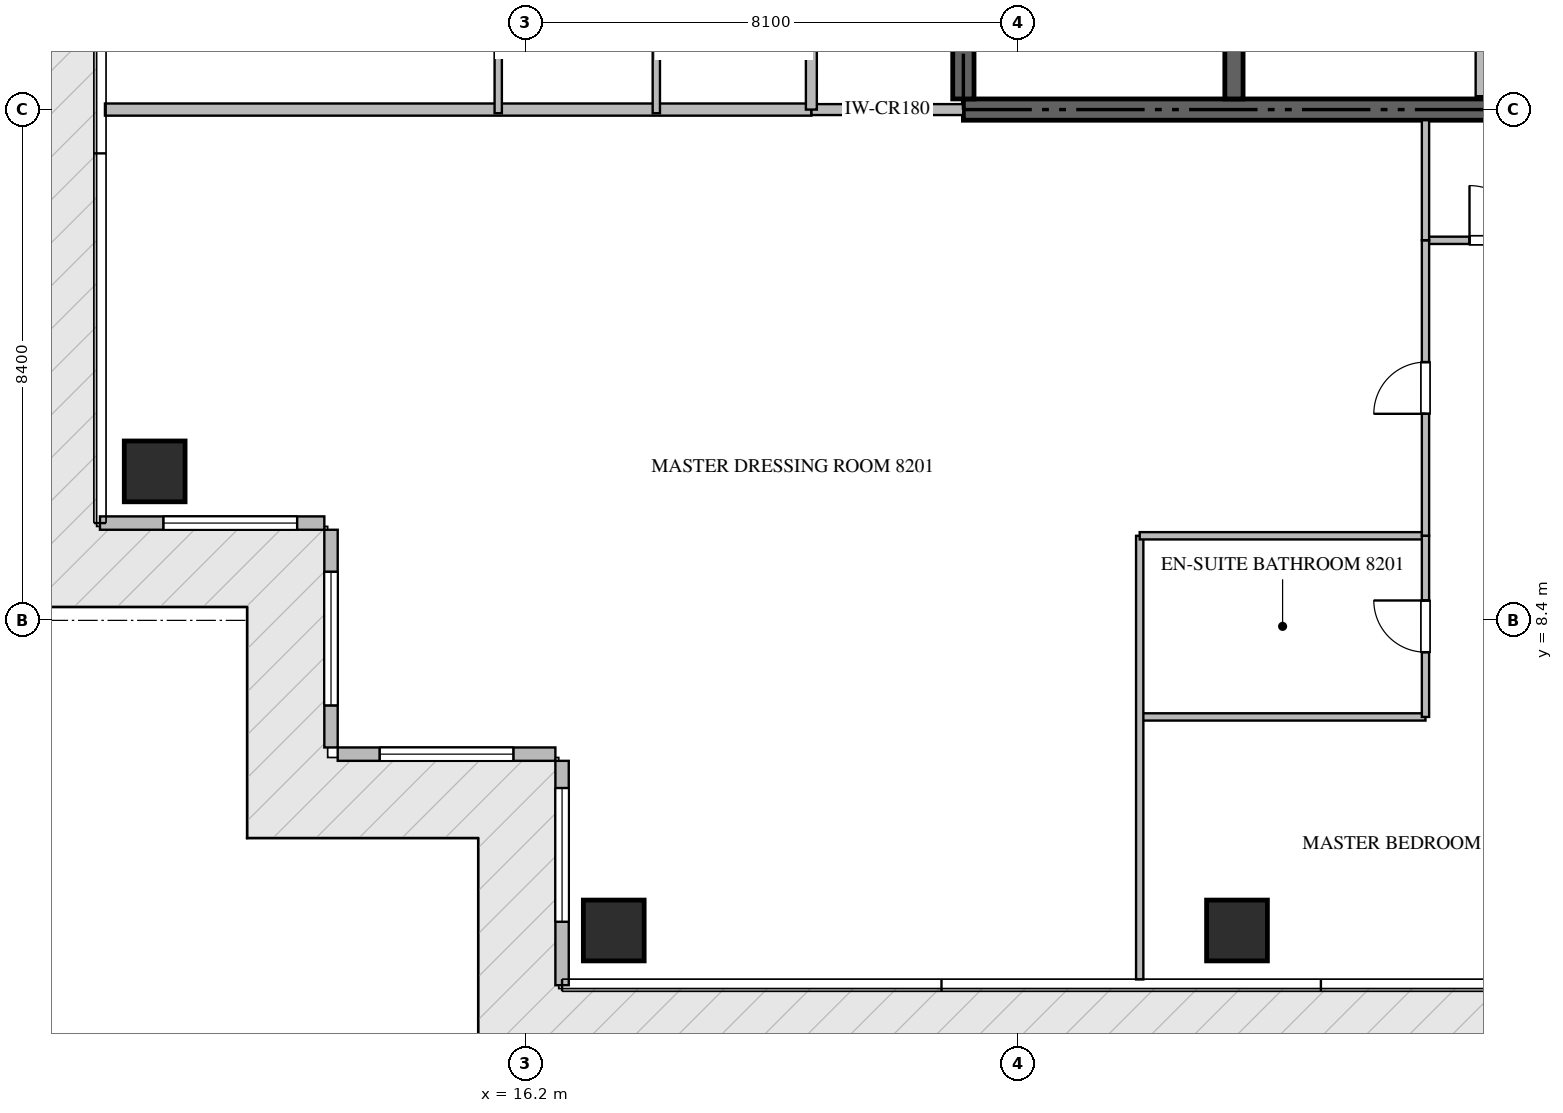
"""IFC4 building model, lengths in metres.
Left out: names, types, materials, properties, quantities, classifications, styles, units other than length and angle.
Written with IfcOpenShell. Run it as: python <this file> out.ifc"""

import sys

from ifc_helpers import new_model, si_unit, direction, frame, frame_2d, origin, origin_2d, place, context, subcontext, project, spatial, rectangle, extrude, source, transform, mapped, element, fill, save


model = new_model("IFC4")
c1 = context("Model", 3, precision=1e-05, world=origin(), true_north=direction((0.0, 1.0)))
c2 = subcontext(c1, "Body", "Model", "MODEL_VIEW")
j1 = project(units=[si_unit("LENGTHUNIT", "METRE"), si_unit("PLANEANGLEUNIT", "RADIAN")], contexts=[c1])
p1 = place(None, origin())
s1 = spatial("IfcSite", under=j1, at=p1, CompositionType="ELEMENT")
p2 = place(p1, origin())
s2 = spatial("IfcBuilding", under=s1, at=p2, CompositionType="ELEMENT")
p3 = place(p2, frame((0.0, 0.0, 329.9)))
s3 = spatial("IfcBuildingStorey", under=s2, at=p3, CompositionType="ELEMENT", Elevation=329.9)
p4 = place(p3, frame((23.4, 16.8, -0.26), z_axis=(0.0, 0.0, 1.0), x_axis=(1.0, 0.0, 0.0)))
e1 = element("IfcWall", 1, at=p4, inside=s3, PredefinedType="SHEAR", context=c2, shape_type="SweptSolid", body=[
    extrude(rectangle(XDim=18.0, YDim=0.35, at=frame_2d((9.0, 0.0))), origin(), (0.0, 0.0, 1.0), 4.048),
])
p5 = place(p3, frame((23.4, 16.975, -0.26), z_axis=(0.0, 0.0, 1.0), x_axis=(0.0, 1.0, 0.0)))
e2 = element("IfcWall", 2, at=p5, inside=s3, PredefinedType="SHEAR", context=c2, shape_type="SweptSolid", body=[
    extrude(rectangle(XDim=4.875, YDim=0.35, at=frame_2d((2.438, 0.0))), origin(), (0.0, 0.0, 1.0), 4.048),
])
p6 = place(p3, frame((27.85, 16.975, -0.26), z_axis=(0.0, 0.0, 1.0), x_axis=(0.0, 1.0, 0.0)))
e3 = element("IfcWall", 3, at=p6, inside=s3, PredefinedType="SHEAR", context=c2, shape_type="SweptSolid", body=[
    extrude(rectangle(XDim=4.875, YDim=0.3, at=frame_2d((2.438, 0.0))), origin(), (0.0, 0.0, 1.0), 4.048),
])
m1 = source(origin(), c2, "Body", "SweptSolid", [
    extrude(rectangle(XDim=1.0, YDim=1.0, at=origin_2d()), origin(), (0.0, 0.0, 1.0), 4.05),
])
for number, where, z_axis, x_axis in (
    (4, (17.65, 3.3, -0.26), (0.0, 0.0, 1.0), (1.0, 0.0, 0.0)),
    (5, (27.9, 3.3, -0.26), (0.0, 0.0, 1.0), (1.0, 0.0, 0.0)),
    (6, (10.1, 10.85, -0.26), (0.0, 0.0, 1.0), (1.0, 0.0, 0.0)),
):
    element("IfcColumn", number, at=place(p3, frame(where, z_axis=z_axis, x_axis=x_axis)), inside=s3, PredefinedType="COLUMN", context=c2, shape_type="MappedRepresentation", body=[
        mapped(m1, transform((0.0, 0.0, 0.0), scale=1.0)),
    ])
p7 = place(p3, frame((9.2, 10.0, 0.0), z_axis=(0.0, 0.0, 1.0), x_axis=(1.0, 0.0, 0.0)))
e7 = element("IfcWall", 7, at=p7, inside=s3, PredefinedType="ELEMENTEDWALL", context=c2, shape_type="SweptSolid", body=[
    extrude(rectangle(XDim=3.69, YDim=0.22, at=frame_2d((1.845, 0.0))), origin(), (0.0, 0.0, 1.0), 3.775),
])
p8 = place(p7, frame((1.043, 0.0, 0.65)))
e8 = element("IfcOpeningElement", 8, at=p8, cuts=e7, PredefinedType="OPENING", context=c2, shape_type="SweptSolid", body=[
    extrude(rectangle(XDim=2.2, YDim=2.4, at=frame_2d((1.1, 1.2))), frame((0.0, 0.12, 0.0), z_axis=(0.0, -1.0, 0.0), x_axis=(1.0, 0.0, 0.0)), (0.0, 0.0, 1.0), 0.24),
])
p9 = place(p3, frame((13.0, 9.89, 0.0), z_axis=(0.0, 0.0, 1.0), x_axis=(0.0, -1.0, 0.0)))
e9 = element("IfcWall", 9, at=p9, inside=s3, PredefinedType="ELEMENTEDWALL", context=c2, shape_type="SweptSolid", body=[
    extrude(rectangle(XDim=3.58, YDim=0.22, at=frame_2d((1.79, 0.0))), origin(), (0.0, 0.0, 1.0), 3.775),
])
p10 = place(p9, frame((0.69, 0.0, 0.65)))
e10 = element("IfcOpeningElement", 10, at=p10, cuts=e9, PredefinedType="OPENING", context=c2, shape_type="SweptSolid", body=[
    extrude(rectangle(XDim=2.2, YDim=2.4, at=frame_2d((1.1, 1.2))), frame((0.0, 0.12, 0.0), z_axis=(0.0, -1.0, 0.0), x_axis=(1.0, 0.0, 0.0)), (0.0, 0.0, 1.0), 0.24),
])
p11 = place(p3, frame((13.11, 6.2, 0.0), z_axis=(0.0, 0.0, 1.0), x_axis=(1.0, 0.0, 0.0)))
e11 = element("IfcWall", 11, at=p11, inside=s3, PredefinedType="ELEMENTEDWALL", context=c2, shape_type="SweptSolid", body=[
    extrude(rectangle(XDim=3.58, YDim=0.22, at=frame_2d((1.79, 0.0))), origin(), (0.0, 0.0, 1.0), 3.775),
])
p12 = place(p11, frame((0.69, 0.0, 0.65)))
e12 = element("IfcOpeningElement", 12, at=p12, cuts=e11, PredefinedType="OPENING", context=c2, shape_type="SweptSolid", body=[
    extrude(rectangle(XDim=2.2, YDim=2.4, at=frame_2d((1.1, 1.2))), frame((0.0, 0.12, 0.0), z_axis=(0.0, -1.0, 0.0), x_axis=(1.0, 0.0, 0.0)), (0.0, 0.0, 1.0), 0.24),
])
p13 = place(p3, frame((16.8, 6.09, 0.0), z_axis=(0.0, 0.0, 1.0), x_axis=(0.0, -1.0, 0.0)))
e13 = element("IfcWall", 13, at=p13, inside=s3, PredefinedType="ELEMENTEDWALL", context=c2, shape_type="SweptSolid", body=[
    extrude(rectangle(XDim=3.69, YDim=0.22, at=frame_2d((1.845, 0.0))), origin(), (0.0, 0.0, 1.0), 3.775),
])
p14 = place(p13, frame((0.447, 0.0, 0.65)))
e14 = element("IfcOpeningElement", 14, at=p14, cuts=e13, PredefinedType="OPENING", context=c2, shape_type="SweptSolid", body=[
    extrude(rectangle(XDim=2.2, YDim=2.4, at=frame_2d((1.1, 1.2))), frame((0.0, 0.12, 0.0), z_axis=(0.0, -1.0, 0.0), x_axis=(1.0, 0.0, 0.0)), (0.0, 0.0, 1.0), 0.24),
])
p15 = place(p3, frame((31.9, 17.02, 0.0), z_axis=(0.0, 0.0, 1.0), x_axis=(0.0, 1.0, 0.0)))
e15 = element("IfcWall", 15, at=p15, inside=s3, PredefinedType="PARTITIONING", context=c2, shape_type="SweptSolid", body=[
    extrude(rectangle(XDim=2.73, YDim=0.15, at=frame_2d((1.365, 0.0))), origin(), (0.0, 0.0, 1.0), 3.79),
])
p16 = place(p3, frame((9.282, 16.8, 0.0), z_axis=(0.0, 0.0, 1.0), x_axis=(1.0, 0.0, 0.0)))
e16 = element("IfcWall", 16, at=p16, inside=s3, PredefinedType="PARTITIONING", context=c2, shape_type="SweptSolid", body=[
    extrude(rectangle(XDim=11.618, YDim=0.2, at=frame_2d((5.809, 0.0))), origin(), (0.0, 0.0, 1.0), 3.79),
])
p17 = place(p3, frame((20.902, 16.8, 0.0), z_axis=(0.0, 0.0, 1.0), x_axis=(1.0, 0.0, 0.0)))
e17 = element("IfcWall", 17, at=p17, inside=s3, PredefinedType="PARTITIONING", context=c2, shape_type="SweptSolid", body=[
    extrude(rectangle(XDim=2.496, YDim=0.18, at=frame_2d((1.248, 0.0))), origin(), (0.0, 0.0, 1.0), 3.79),
])
p18 = place(p3, frame((20.9, 16.8, 0.0), z_axis=(0.0, 0.0, 1.0), x_axis=(0.0, 1.0, 0.0)))
e18 = element("IfcWall", 18, at=p18, inside=s3, PredefinedType="PARTITIONING", context=c2, shape_type="SweptSolid", body=[
    extrude(rectangle(XDim=16.8, YDim=0.18, at=frame_2d((8.4, 0.0))), origin(), (0.0, 0.0, 1.0), 3.79),
])
p19 = place(p18, frame((4.803, 0.0, 0.0)))
e19 = element("IfcOpeningElement", 19, at=p19, cuts=e18, PredefinedType="OPENING", context=c2, shape_type="SweptSolid", body=[
    extrude(rectangle(XDim=1.0, YDim=2.15, at=frame_2d((0.5, 1.075))), frame((0.0, 0.1, 0.0), z_axis=(0.0, -1.0, 0.0), x_axis=(1.0, 0.0, 0.0)), (0.0, 0.0, 1.0), 0.2),
])
p20 = place(p18, frame((13.225, 0.0, 0.0)))
e20 = element("IfcOpeningElement", 20, at=p20, cuts=e18, PredefinedType="OPENING", context=c2, shape_type="SweptSolid", body=[
    extrude(rectangle(XDim=1.0, YDim=2.15, at=frame_2d((0.5, 1.075))), frame((0.0, 0.1, 0.0), z_axis=(0.0, -1.0, 0.0), x_axis=(1.0, 0.0, 0.0)), (0.0, 0.0, 1.0), 0.2),
])
p21 = place(p3, frame((31.0, 14.65, 0.0), z_axis=(0.0, 0.0, 1.0), x_axis=(1.0, 0.0, 0.0)))
e21 = element("IfcWall", 21, at=p21, inside=s3, PredefinedType="PARTITIONING", context=c2, shape_type="SweptSolid", body=[
    extrude(rectangle(XDim=2.348, YDim=0.12, at=frame_2d((1.174, 0.0))), origin(), (0.0, 0.0, 1.0), 3.79),
])
p22 = place(p21, frame((0.724, 0.0, 0.0)))
e22 = element("IfcOpeningElement", 22, at=p22, cuts=e21, PredefinedType="OPENING", context=c2, shape_type="SweptSolid", body=[
    extrude(rectangle(XDim=0.9, YDim=2.1, at=frame_2d((0.45, 1.05))), frame((0.0, 0.07, 0.0), z_axis=(0.0, -1.0, 0.0), x_axis=(1.0, 0.0, 0.0)), (0.0, 0.0, 1.0), 0.14),
])
p23 = place(p3, frame((26.3, 6.812, 0.0), z_axis=(0.0, 0.0, 1.0), x_axis=(1.0, 0.0, 0.0)))
e23 = element("IfcWall", 23, at=p23, inside=s3, PredefinedType="PARTITIONING", context=c2, shape_type="SweptSolid", body=[
    extrude(rectangle(XDim=4.7, YDim=0.12, at=frame_2d((2.35, 0.0))), origin(), (0.0, 0.0, 1.0), 3.79),
])
p24 = place(p3, frame((26.3, 2.495, 0.0), z_axis=(0.0, 0.0, 1.0), x_axis=(0.0, 1.0, 0.0)))
e24 = element("IfcWall", 24, at=p24, inside=s3, PredefinedType="PARTITIONING", context=c2, shape_type="SweptSolid", body=[
    extrude(rectangle(XDim=7.296, YDim=0.12, at=frame_2d((3.648, 0.0))), origin(), (0.0, 0.0, 1.0), 3.79),
])
p25 = place(p3, frame((26.3, 9.791, 0.0), z_axis=(0.0, 0.0, 1.0), x_axis=(1.0, 0.0, 0.0)))
e25 = element("IfcWall", 25, at=p25, inside=s3, PredefinedType="PARTITIONING", context=c2, shape_type="SweptSolid", body=[
    extrude(rectangle(XDim=4.7, YDim=0.12, at=frame_2d((2.35, 0.0))), origin(), (0.0, 0.0, 1.0), 3.79),
])
p26 = place(p3, frame((31.0, 6.812, 0.0), z_axis=(0.0, 0.0, 1.0), x_axis=(0.0, 1.0, 0.0)))
e26 = element("IfcWall", 26, at=p26, inside=s3, PredefinedType="PARTITIONING", context=c2, shape_type="SweptSolid", body=[
    extrude(rectangle(XDim=2.979, YDim=0.12, at=frame_2d((1.49, 0.0))), origin(), (0.0, 0.0, 1.0), 3.79),
])
p27 = place(p26, frame((1.065, 0.0, 0.0)))
e27 = element("IfcOpeningElement", 27, at=p27, cuts=e26, PredefinedType="OPENING", context=c2, shape_type="SweptSolid", body=[
    extrude(rectangle(XDim=0.85, YDim=2.1, at=frame_2d((0.425, 1.05))), frame((0.0, 0.07, 0.0), z_axis=(0.0, -1.0, 0.0), x_axis=(1.0, 0.0, 0.0)), (0.0, 0.0, 1.0), 0.14),
])
p28 = place(p3, frame((31.0, 9.793, 0.0), z_axis=(0.0, 0.0, 1.0), x_axis=(0.0, 1.0, 0.0)))
e28 = element("IfcWall", 28, at=p28, inside=s3, PredefinedType="PARTITIONING", context=c2, shape_type="SweptSolid", body=[
    extrude(rectangle(XDim=4.857, YDim=0.12, at=frame_2d((2.428, 0.0))), origin(), (0.0, 0.0, 1.0), 3.79),
])
p29 = place(p28, frame((2.004, 0.0, 0.0)))
e29 = element("IfcOpeningElement", 29, at=p29, cuts=e28, PredefinedType="OPENING", context=c2, shape_type="SweptSolid", body=[
    extrude(rectangle(XDim=0.85, YDim=2.1, at=frame_2d((0.425, 1.05))), frame((0.0, 0.07, 0.0), z_axis=(0.0, -1.0, 0.0), x_axis=(1.0, 0.0, 0.0)), (0.0, 0.0, 1.0), 0.14),
])
p30 = place(p3, frame((31.0, 14.652, 0.0), z_axis=(0.0, 0.0, 1.0), x_axis=(0.0, 1.0, 0.0)))
e30 = element("IfcWall", 30, at=p30, inside=s3, PredefinedType="PARTITIONING", context=c2, shape_type="SweptSolid", body=[
    extrude(rectangle(XDim=1.973, YDim=0.12, at=frame_2d((0.986, 0.0))), origin(), (0.0, 0.0, 1.0), 3.79),
])
for number, where, z_axis, x_axis in (
    (31, (18.35, 16.74, 0.0), (0.0, 0.0, 1.0), (0.0, 1.0, 0.0)),
    (32, (15.75, 16.74, 0.0), (0.0, 0.0, 1.0), (0.0, 1.0, 0.0)),
):
    element("IfcWall", number, at=place(p3, frame(where, z_axis=z_axis, x_axis=x_axis)), inside=s3, PredefinedType="PARTITIONING", context=c2, shape_type="SweptSolid", body=[
        extrude(rectangle(XDim=2.66, YDim=0.12, at=frame_2d((1.33, 0.0))), origin(), (0.0, 0.0, 1.0), 3.79),
    ])
m2 = source(origin(), c2, "Body", "SweptSolid", [
    extrude(rectangle(XDim=2.2, YDim=2.4, at=frame_2d((1.1, 1.2))), frame((0.0, 0.03, 0.0), z_axis=(0.0, -1.0, 0.0), x_axis=(1.0, 0.0, 0.0)), (0.0, 0.0, 1.0), 0.06),
])
p31 = place(p8, origin())
e33 = element("IfcWindow", 33, at=p31, inside=s3, PartitioningType="SINGLE_PANEL", PredefinedType="WINDOW", context=c2, shape_type="MappedRepresentation", body=[
    mapped(m2, transform((0.0, 0.0, 0.0), scale=1.0)),
])
fill(e8, e33)
p32 = place(p10, origin())
e34 = element("IfcWindow", 34, at=p32, inside=s3, PartitioningType="SINGLE_PANEL", PredefinedType="WINDOW", context=c2, shape_type="MappedRepresentation", body=[
    mapped(m2, transform((0.0, 0.0, 0.0), scale=1.0)),
])
fill(e10, e34)
p33 = place(p12, origin())
e35 = element("IfcWindow", 35, at=p33, inside=s3, PartitioningType="SINGLE_PANEL", PredefinedType="WINDOW", context=c2, shape_type="MappedRepresentation", body=[
    mapped(m2, transform((0.0, 0.0, 0.0), scale=1.0)),
])
fill(e12, e35)
p34 = place(p14, origin())
e36 = element("IfcWindow", 36, at=p34, inside=s3, PartitioningType="SINGLE_PANEL", PredefinedType="WINDOW", context=c2, shape_type="MappedRepresentation", body=[
    mapped(m2, transform((0.0, 0.0, 0.0), scale=1.0)),
])
fill(e14, e36)
m3 = source(origin(), c2, "Body", "SweptSolid", [
    extrude(rectangle(XDim=0.9, YDim=2.1, at=frame_2d((0.45, 1.05))), frame((0.0, 0.025, 0.0), z_axis=(0.0, -1.0, 0.0), x_axis=(1.0, 0.0, 0.0)), (0.0, 0.0, 1.0), 0.05),
])
p35 = place(p22, origin())
e37 = element("IfcDoor", 37, at=p35, inside=s3, OperationType="SINGLE_SWING_LEFT", PredefinedType="DOOR", context=c2, shape_type="MappedRepresentation", body=[
    mapped(m3, transform((0.0, 0.0, 0.0), scale=1.0)),
])
fill(e22, e37)
m4 = source(origin(), c2, "Body", "SweptSolid", [
    extrude(rectangle(XDim=0.85, YDim=2.1, at=frame_2d((0.425, 1.05))), frame((0.0, 0.025, 0.0), z_axis=(0.0, -1.0, 0.0), x_axis=(1.0, 0.0, 0.0)), (0.0, 0.0, 1.0), 0.05),
])
p36 = place(p27, origin())
e38 = element("IfcDoor", 38, at=p36, inside=s3, OperationType="SINGLE_SWING_RIGHT", PredefinedType="DOOR", context=c2, shape_type="MappedRepresentation", body=[
    mapped(m4, transform((0.0, 0.0, 0.0), scale=1.0)),
])
fill(e27, e38)
p37 = place(p29, origin())
e39 = element("IfcDoor", 39, at=p37, inside=s3, OperationType="SINGLE_SWING_LEFT", PredefinedType="DOOR", context=c2, shape_type="MappedRepresentation", body=[
    mapped(m4, transform((0.0, 0.0, 0.0), scale=1.0)),
])
fill(e29, e39)
save(model, sys.argv[1])
